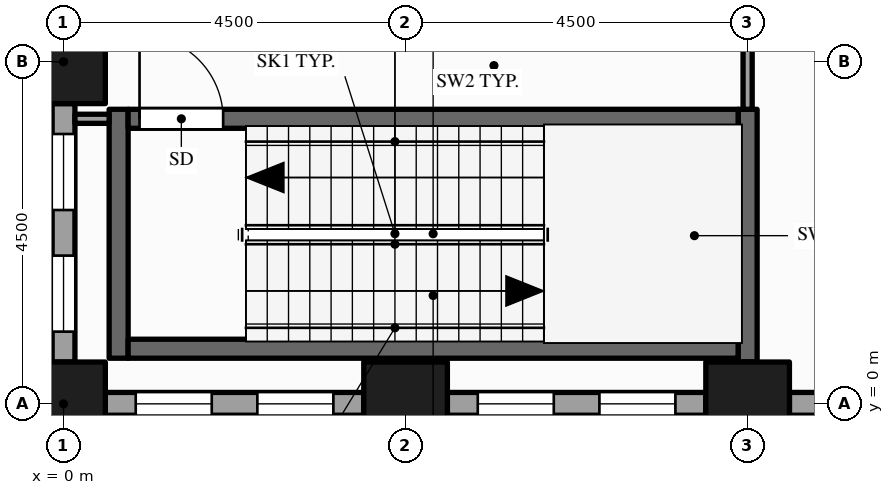
"""IFC4 building model, lengths in metres.
Left out: names, types, materials, properties, quantities, classifications, styles, units other than length and angle.
Written with IfcOpenShell. Run it as: python <this file> out.ifc"""

import sys

from ifc_helpers import new_model, si_unit, direction, frame, frame_2d, origin, origin_2d, place, context, subcontext, project, spatial, rectangle, hollow_rectangle, extrude, element, fill, save


model = new_model("IFC4")
c1 = context("Model", 3, precision=1e-05, world=origin(), true_north=direction((0.0, 1.0)))
c2 = subcontext(c1, "Body", "Model", "MODEL_VIEW")
j1 = project(units=[si_unit("LENGTHUNIT", "METRE"), si_unit("PLANEANGLEUNIT", "RADIAN")], contexts=[c1])
p1 = place(None, origin())
s1 = spatial("IfcSite", under=j1, at=p1, CompositionType="ELEMENT")
p2 = place(p1, origin())
s2 = spatial("IfcBuilding", under=s1, at=p2, CompositionType="ELEMENT")
p3 = place(p2, frame((0.0, 0.0, 14.0)))
s3 = spatial("IfcBuildingStorey", under=s2, at=p3, CompositionType="ELEMENT", Elevation=14.0)
for number, where, z_axis, x_axis in (
    (1, (0.0, 0.0, -0.25), (0.0, 0.0, 1.0), (1.0, 0.0, 0.0)),
    (2, (0.0, 4.5, -0.25), (0.0, 0.0, 1.0), (1.0, 0.0, 0.0)),
    (3, (4.5, 0.0, -0.25), (0.0, 0.0, 1.0), (1.0, 0.0, 0.0)),
    (4, (9.0, 0.0, -0.25), (0.0, 0.0, 1.0), (1.0, 0.0, 0.0)),
):
    element("IfcColumn", number, at=place(p3, frame(where, z_axis=z_axis, x_axis=x_axis)), inside=s3, PredefinedType="COLUMN", context=c2, shape_type="SweptSolid", body=[
        extrude(hollow_rectangle(XDim=1.1, YDim=1.1, WallThickness=0.06, at=origin_2d()), origin(), (0.0, 0.0, 1.0), 5.0),
    ])
p4 = place(p3, frame((0.0, 3.95, 0.0), z_axis=(0.0, 0.0, 1.0), x_axis=(0.0, -1.0, 0.0)))
e5 = element("IfcWall", 5, at=p4, inside=s3, PredefinedType="STANDARD", context=c2, shape_type="SweptSolid", body=[
    extrude(rectangle(XDim=3.4, YDim=0.3, at=frame_2d((1.7, 0.0))), origin(), (0.0, 0.0, 1.0), 4.036),
])
p5 = place(p4, frame((0.4, 0.0, 0.9)))
e6 = element("IfcOpeningElement", 6, at=p5, cuts=e5, PredefinedType="OPENING", context=c2, shape_type="SweptSolid", body=[
    extrude(rectangle(XDim=1.0, YDim=2.75, at=frame_2d((0.5, 1.375))), frame((0.0, 0.16, 0.0), z_axis=(0.0, -1.0, 0.0), x_axis=(1.0, 0.0, 0.0)), (0.0, 0.0, 1.0), 0.32),
])
p6 = place(p4, frame((2.0, 0.0, 0.9)))
e7 = element("IfcOpeningElement", 7, at=p6, cuts=e5, PredefinedType="OPENING", context=c2, shape_type="SweptSolid", body=[
    extrude(rectangle(XDim=1.0, YDim=2.75, at=frame_2d((0.5, 1.375))), frame((0.0, 0.16, 0.0), z_axis=(0.0, -1.0, 0.0), x_axis=(1.0, 0.0, 0.0)), (0.0, 0.0, 1.0), 0.32),
])
p7 = place(p3, frame((0.55, 0.0, 0.0), z_axis=(0.0, 0.0, 1.0), x_axis=(1.0, 0.0, 0.0)))
e8 = element("IfcWall", 8, at=p7, inside=s3, PredefinedType="STANDARD", context=c2, shape_type="SweptSolid", body=[
    extrude(rectangle(XDim=3.4, YDim=0.3, at=frame_2d((1.7, 0.0))), origin(), (0.0, 0.0, 1.0), 4.036),
])
p8 = place(p7, frame((0.4, 0.0, 0.9)))
e9 = element("IfcOpeningElement", 9, at=p8, cuts=e8, PredefinedType="OPENING", context=c2, shape_type="SweptSolid", body=[
    extrude(rectangle(XDim=1.0, YDim=2.75, at=frame_2d((0.5, 1.375))), frame((0.0, 0.16, 0.0), z_axis=(0.0, -1.0, 0.0), x_axis=(1.0, 0.0, 0.0)), (0.0, 0.0, 1.0), 0.32),
])
p9 = place(p7, frame((2.0, 0.0, 0.9)))
e10 = element("IfcOpeningElement", 10, at=p9, cuts=e8, PredefinedType="OPENING", context=c2, shape_type="SweptSolid", body=[
    extrude(rectangle(XDim=1.0, YDim=2.75, at=frame_2d((0.5, 1.375))), frame((0.0, 0.16, 0.0), z_axis=(0.0, -1.0, 0.0), x_axis=(1.0, 0.0, 0.0)), (0.0, 0.0, 1.0), 0.32),
])
p10 = place(p3, frame((5.05, 0.0, 0.0), z_axis=(0.0, 0.0, 1.0), x_axis=(1.0, 0.0, 0.0)))
e11 = element("IfcWall", 11, at=p10, inside=s3, PredefinedType="STANDARD", context=c2, shape_type="SweptSolid", body=[
    extrude(rectangle(XDim=3.4, YDim=0.3, at=frame_2d((1.7, 0.0))), origin(), (0.0, 0.0, 1.0), 4.036),
])
p11 = place(p10, frame((0.4, 0.0, 0.9)))
e12 = element("IfcOpeningElement", 12, at=p11, cuts=e11, PredefinedType="OPENING", context=c2, shape_type="SweptSolid", body=[
    extrude(rectangle(XDim=1.0, YDim=2.75, at=frame_2d((0.5, 1.375))), frame((0.0, 0.16, 0.0), z_axis=(0.0, -1.0, 0.0), x_axis=(1.0, 0.0, 0.0)), (0.0, 0.0, 1.0), 0.32),
])
p12 = place(p10, frame((2.0, 0.0, 0.9)))
e13 = element("IfcOpeningElement", 13, at=p12, cuts=e11, PredefinedType="OPENING", context=c2, shape_type="SweptSolid", body=[
    extrude(rectangle(XDim=1.0, YDim=2.75, at=frame_2d((0.5, 1.375))), frame((0.0, 0.16, 0.0), z_axis=(0.0, -1.0, 0.0), x_axis=(1.0, 0.0, 0.0)), (0.0, 0.0, 1.0), 0.32),
])
p13 = place(p3, frame((9.55, 0.0, 0.0), z_axis=(0.0, 0.0, 1.0), x_axis=(1.0, 0.0, 0.0)))
e14 = element("IfcWall", 14, at=p13, inside=s3, PredefinedType="STANDARD", context=c2, shape_type="SweptSolid", body=[
    extrude(rectangle(XDim=3.4, YDim=0.3, at=frame_2d((1.7, 0.0))), origin(), (0.0, 0.0, 1.0), 4.036),
])
p14 = place(p13, frame((0.4, 0.0, 0.9)))
e15 = element("IfcOpeningElement", 15, at=p14, cuts=e14, PredefinedType="OPENING", context=c2, shape_type="SweptSolid", body=[
    extrude(rectangle(XDim=1.0, YDim=2.75, at=frame_2d((0.5, 1.375))), frame((0.0, 0.16, 0.0), z_axis=(0.0, -1.0, 0.0), x_axis=(1.0, 0.0, 0.0)), (0.0, 0.0, 1.0), 0.32),
])
p15 = place(p13, frame((2.0, 0.0, 0.9)))
e16 = element("IfcOpeningElement", 16, at=p15, cuts=e14, PredefinedType="OPENING", context=c2, shape_type="SweptSolid", body=[
    extrude(rectangle(XDim=1.0, YDim=2.75, at=frame_2d((0.5, 1.375))), frame((0.0, 0.16, 0.0), z_axis=(0.0, -1.0, 0.0), x_axis=(1.0, 0.0, 0.0)), (0.0, 0.0, 1.0), 0.32),
])
p16 = place(p3, frame((0.725, 0.6, 0.0), z_axis=(0.0, 0.0, 1.0), x_axis=(0.0, 1.0, 0.0)))
e17 = element("IfcWall", 17, at=p16, inside=s3, PredefinedType="SHEAR", context=c2, shape_type="SweptSolid", body=[
    extrude(rectangle(XDim=3.275, YDim=0.25, at=frame_2d((1.637, 0.0))), origin(), (0.0, 0.0, 1.0), 4.75),
])
p17 = place(p3, frame((9.0, 0.15, 0.0), z_axis=(0.0, 0.0, 1.0), x_axis=(0.0, 1.0, 0.0)))
e18 = element("IfcWall", 18, at=p17, inside=s3, PredefinedType="PARTITIONING", context=c2, shape_type="SweptSolid", body=[
    extrude(rectangle(XDim=0.4, YDim=0.12, at=frame_2d((0.2, 0.0))), origin(), (0.0, 0.0, 1.0), 4.75),
])
p18 = place(p3, frame((9.0, 0.55, 0.0), z_axis=(0.0, 0.0, 1.0), x_axis=(0.0, 1.0, 0.0)))
e19 = element("IfcWall", 19, at=p18, inside=s3, PredefinedType="SHEAR", context=c2, shape_type="SweptSolid", body=[
    extrude(rectangle(XDim=3.325, YDim=0.25, at=frame_2d((1.663, 0.0))), origin(), (0.0, 0.0, 1.0), 4.75),
])
p19 = place(p3, frame((9.0, 3.875, 0.0), z_axis=(0.0, 0.0, 1.0), x_axis=(0.0, 1.0, 0.0)))
e20 = element("IfcWall", 20, at=p19, inside=s3, PredefinedType="PARTITIONING", context=c2, shape_type="SweptSolid", body=[
    extrude(rectangle(XDim=5.425, YDim=0.12, at=frame_2d((2.712, 0.0))), origin(), (0.0, 0.0, 1.0), 3.759),
])
p20 = place(p3, frame((0.85, 0.725, 0.0), z_axis=(0.0, 0.0, 1.0), x_axis=(1.0, 0.0, 0.0)))
e21 = element("IfcWall", 21, at=p20, inside=s3, PredefinedType="SHEAR", context=c2, shape_type="SweptSolid", body=[
    extrude(rectangle(XDim=8.025, YDim=0.25, at=frame_2d((4.012, 0.0))), origin(), (0.0, 0.0, 1.0), 4.75),
])
p21 = place(p3, frame((0.15, 3.75, 0.0), z_axis=(0.0, 0.0, 1.0), x_axis=(1.0, 0.0, 0.0)))
e22 = element("IfcWall", 22, at=p21, inside=s3, PredefinedType="PARTITIONING", context=c2, shape_type="SweptSolid", body=[
    extrude(rectangle(XDim=0.45, YDim=0.12, at=frame_2d((0.225, 0.0))), origin(), (0.0, 0.0, 1.0), 4.036),
])
p22 = place(p3, frame((0.85, 3.75, 0.0), z_axis=(0.0, 0.0, 1.0), x_axis=(1.0, 0.0, 0.0)))
e23 = element("IfcWall", 23, at=p22, inside=s3, PredefinedType="SHEAR", context=c2, shape_type="SweptSolid", body=[
    extrude(rectangle(XDim=8.025, YDim=0.25, at=frame_2d((4.012, 0.0))), origin(), (0.0, 0.0, 1.0), 4.75),
])
p23 = place(p22, frame((0.15, 0.0, 0.0)))
e24 = element("IfcOpeningElement", 24, at=p23, cuts=e23, PredefinedType="OPENING", context=c2, shape_type="SweptSolid", body=[
    extrude(rectangle(XDim=1.1, YDim=2.1, at=frame_2d((0.55, 1.05))), frame((0.0, 0.135, 0.0), z_axis=(0.0, -1.0, 0.0), x_axis=(1.0, 0.0, 0.0)), (0.0, 0.0, 1.0), 0.27),
])
p24 = place(p5, origin())
e25 = element("IfcWindow", 25, at=p24, inside=s3, PartitioningType="SINGLE_PANEL", PredefinedType="WINDOW", context=c2, shape_type="SweptSolid", body=[
    extrude(rectangle(XDim=1.0, YDim=2.75, at=frame_2d((0.5, 1.375))), frame((0.0, 0.03, 0.0), z_axis=(0.0, -1.0, 0.0), x_axis=(1.0, 0.0, 0.0)), (0.0, 0.0, 1.0), 0.06),
])
fill(e6, e25)
p25 = place(p6, origin())
e26 = element("IfcWindow", 26, at=p25, inside=s3, PartitioningType="SINGLE_PANEL", PredefinedType="WINDOW", context=c2, shape_type="SweptSolid", body=[
    extrude(rectangle(XDim=1.0, YDim=2.75, at=frame_2d((0.5, 1.375))), frame((0.0, 0.03, 0.0), z_axis=(0.0, -1.0, 0.0), x_axis=(1.0, 0.0, 0.0)), (0.0, 0.0, 1.0), 0.06),
])
fill(e7, e26)
p26 = place(p8, origin())
e27 = element("IfcWindow", 27, at=p26, inside=s3, PartitioningType="SINGLE_PANEL", PredefinedType="WINDOW", context=c2, shape_type="SweptSolid", body=[
    extrude(rectangle(XDim=1.0, YDim=2.75, at=frame_2d((0.5, 1.375))), frame((0.0, 0.03, 0.0), z_axis=(0.0, -1.0, 0.0), x_axis=(1.0, 0.0, 0.0)), (0.0, 0.0, 1.0), 0.06),
])
fill(e9, e27)
p27 = place(p9, origin())
e28 = element("IfcWindow", 28, at=p27, inside=s3, PartitioningType="SINGLE_PANEL", PredefinedType="WINDOW", context=c2, shape_type="SweptSolid", body=[
    extrude(rectangle(XDim=1.0, YDim=2.75, at=frame_2d((0.5, 1.375))), frame((0.0, 0.03, 0.0), z_axis=(0.0, -1.0, 0.0), x_axis=(1.0, 0.0, 0.0)), (0.0, 0.0, 1.0), 0.06),
])
fill(e10, e28)
p28 = place(p11, origin())
e29 = element("IfcWindow", 29, at=p28, inside=s3, PartitioningType="SINGLE_PANEL", PredefinedType="WINDOW", context=c2, shape_type="SweptSolid", body=[
    extrude(rectangle(XDim=1.0, YDim=2.75, at=frame_2d((0.5, 1.375))), frame((0.0, 0.03, 0.0), z_axis=(0.0, -1.0, 0.0), x_axis=(1.0, 0.0, 0.0)), (0.0, 0.0, 1.0), 0.06),
])
fill(e12, e29)
p29 = place(p12, origin())
e30 = element("IfcWindow", 30, at=p29, inside=s3, PartitioningType="SINGLE_PANEL", PredefinedType="WINDOW", context=c2, shape_type="SweptSolid", body=[
    extrude(rectangle(XDim=1.0, YDim=2.75, at=frame_2d((0.5, 1.375))), frame((0.0, 0.03, 0.0), z_axis=(0.0, -1.0, 0.0), x_axis=(1.0, 0.0, 0.0)), (0.0, 0.0, 1.0), 0.06),
])
fill(e13, e30)
p30 = place(p23, origin())
e31 = element("IfcDoor", 31, at=p30, inside=s3, OperationType="SINGLE_SWING_LEFT", PredefinedType="DOOR", context=c2, shape_type="SweptSolid", body=[
    extrude(rectangle(XDim=1.1, YDim=2.1, at=frame_2d((0.55, 1.05))), frame((0.0, 0.025, 0.0), z_axis=(0.0, -1.0, 0.0), x_axis=(1.0, 0.0, 0.0)), (0.0, 0.0, 1.0), 0.05),
])
fill(e24, e31)
save(model, sys.argv[1])
